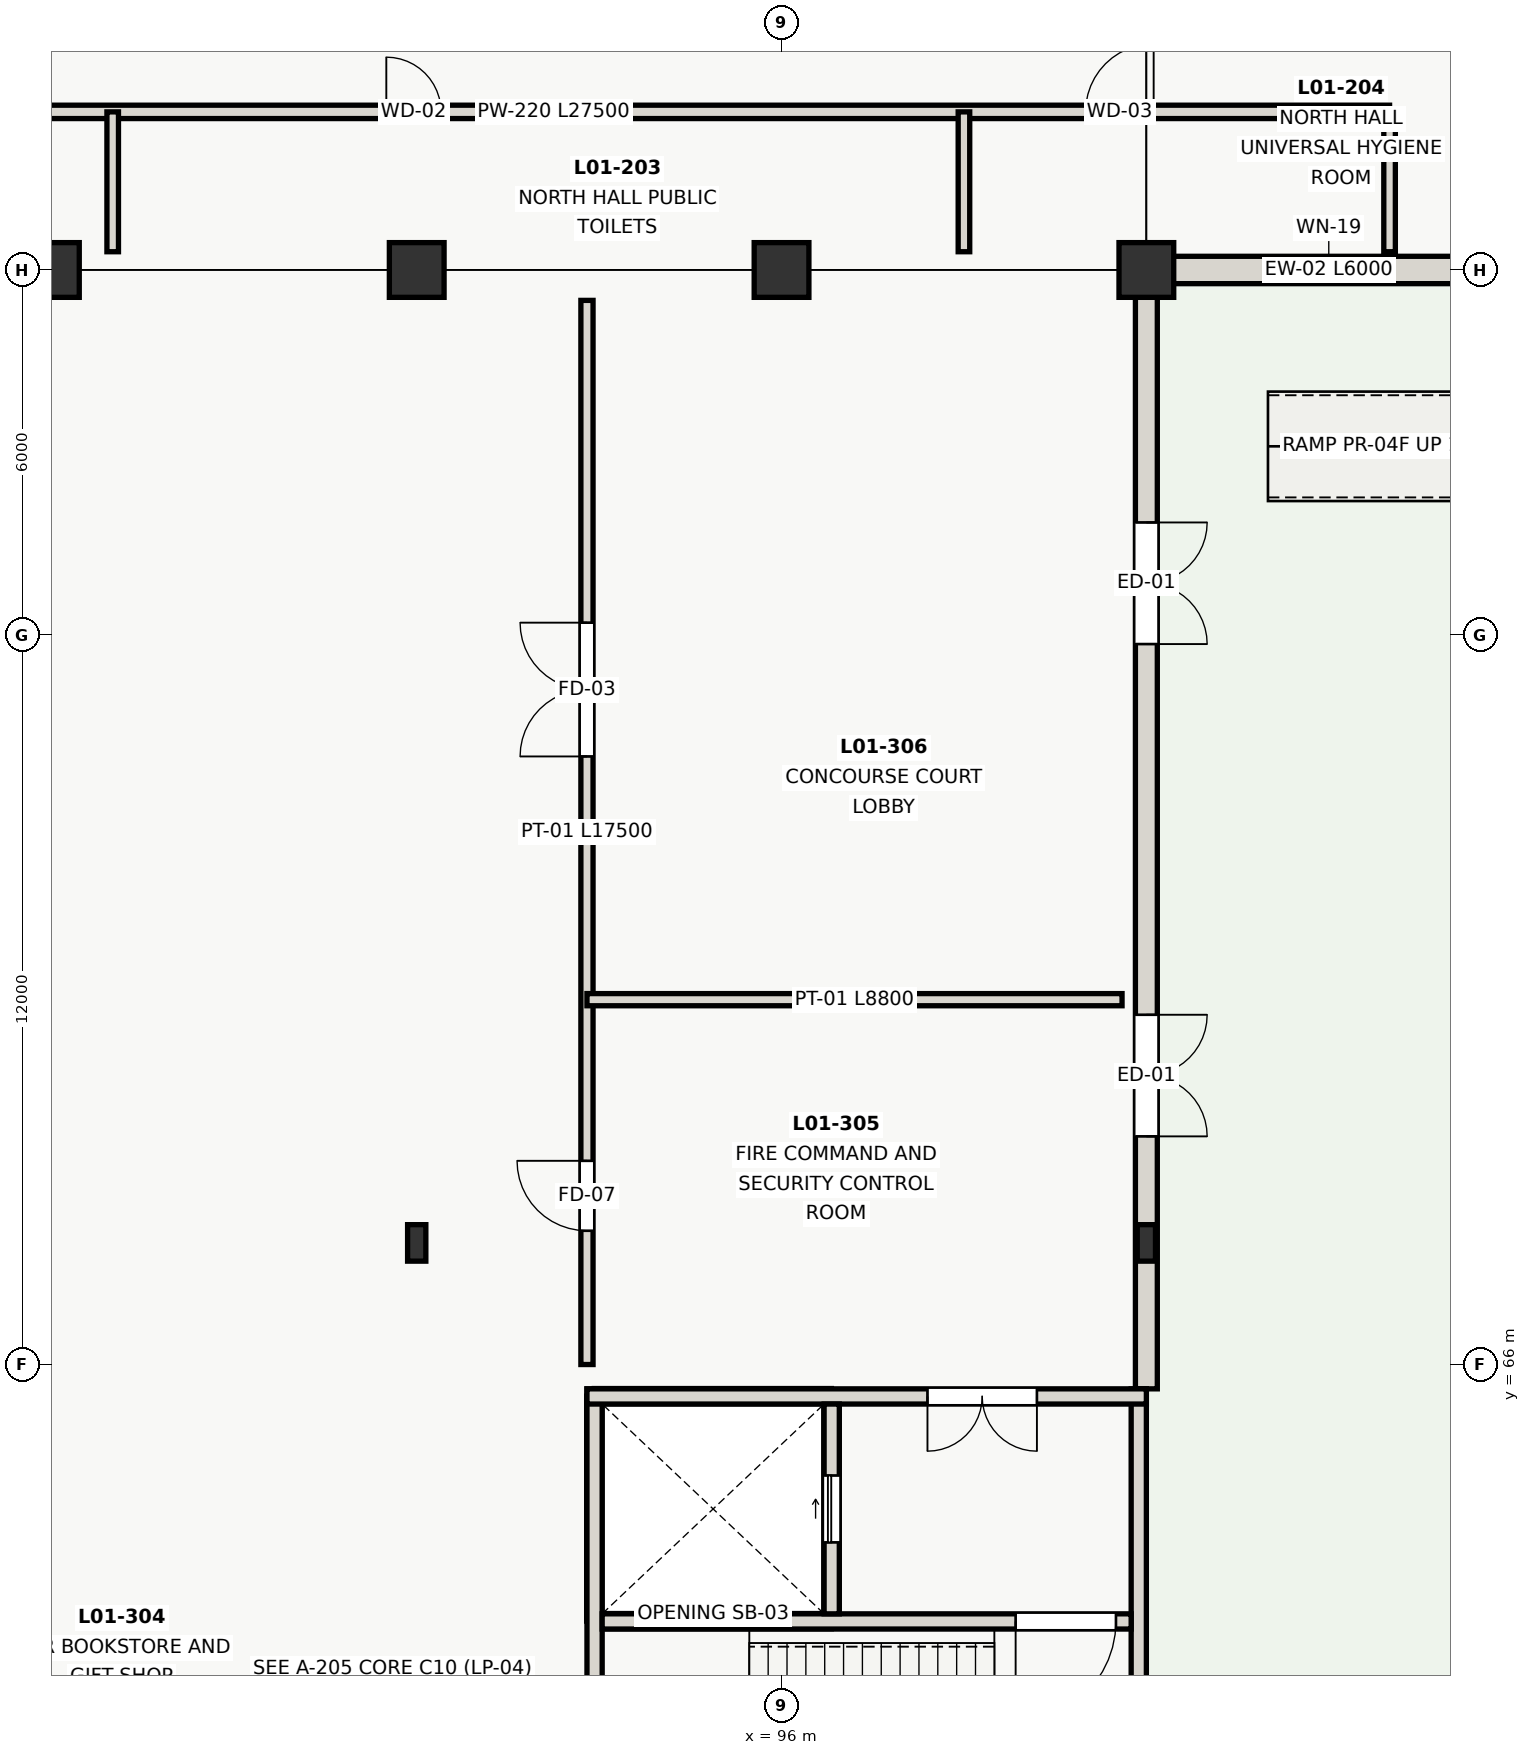
"""IFC4 building model, lengths in metres.
Left out: names, types, materials, properties, quantities, classifications, styles, units other than length and angle.
Written with IfcOpenShell. Run it as: python <this file> out.ifc"""

import sys

from ifc_helpers import new_model, si_unit, direction, frame, frame_2d, origin, origin_2d, place, context, subcontext, project, spatial, rectangle, i_section, extrude, element, fill, save


model = new_model("IFC4")
c1 = context("Model", 3, precision=1e-05, world=origin(), true_north=direction((0.0, 1.0)))
c2 = subcontext(c1, "Body", "Model", "MODEL_VIEW")
j1 = project(units=[si_unit("LENGTHUNIT", "METRE"), si_unit("PLANEANGLEUNIT", "RADIAN")], contexts=[c1])
p1 = place(None, origin())
s1 = spatial("IfcSite", under=j1, at=p1, CompositionType="ELEMENT")
p2 = place(p1, origin())
s2 = spatial("IfcBuilding", under=s1, at=p2, CompositionType="ELEMENT")
p3 = place(p2, origin())
s3 = spatial("IfcBuildingStorey", under=s2, at=p3, CompositionType="ELEMENT", Elevation=0.0)
for number, where, z_axis, x_axis in (
    (1, (90.0, 68.0, 0.0), (0.0, 0.0, 1.0), (1.0, 0.0, 0.0)),
    (2, (102.0, 68.0, 0.0), (0.0, 0.0, 1.0), (1.0, 0.0, 0.0)),
):
    element("IfcColumn", number, at=place(p3, frame(where, z_axis=z_axis, x_axis=x_axis)), inside=s3, PredefinedType="COLUMN", context=c2, shape_type="SweptSolid", body=[
        extrude(i_section(OverallWidth=0.3, OverallDepth=0.6, WebThickness=0.015, FlangeThickness=0.03, at=origin_2d()), origin(), (0.0, 0.0, 1.0), 4.2),
    ])
for number, where, z_axis, x_axis in (
    (3, (84.0, 84.0, 0.0), (0.0, 0.0, 1.0), (1.0, 0.0, 0.0)),
    (4, (90.0, 84.0, 0.0), (0.0, 0.0, 1.0), (1.0, 0.0, 0.0)),
    (5, (96.0, 84.0, 0.0), (0.0, 0.0, 1.0), (1.0, 0.0, 0.0)),
    (6, (102.0, 84.0, 0.0), (0.0, 0.0, 1.0), (1.0, 0.0, 0.0)),
):
    element("IfcColumn", number, at=place(p3, frame(where, z_axis=z_axis, x_axis=x_axis)), inside=s3, PredefinedType="COLUMN", context=c2, shape_type="SweptSolid", body=[
        extrude(rectangle(XDim=0.9, YDim=0.9, at=origin_2d()), origin(), (0.0, 0.0, 1.0), 4.2),
    ])
p4 = place(p3, frame((108.0, 84.0, 0.0), z_axis=(0.0, 0.0, 1.0), x_axis=(-1.0, 0.0, 0.0)))
e7 = element("IfcWall", 7, at=p4, inside=s3, PredefinedType="SOLIDWALL", context=c2, shape_type="SweptSolid", body=[
    extrude(rectangle(XDim=6.0, YDim=0.45, at=frame_2d((3.0, 0.0))), origin(), (0.0, 0.0, 1.0), 3.56),
])
p5 = place(p4, frame((2.05, 0.0, 0.9)))
e8 = element("IfcOpeningElement", 8, at=p5, cuts=e7, PredefinedType="OPENING", context=c2, shape_type="SweptSolid", body=[
    extrude(rectangle(XDim=1.9, YDim=1.8, at=frame_2d((0.95, 0.9))), frame((0.0, 0.235, 0.0), z_axis=(0.0, -1.0, 0.0), x_axis=(1.0, 0.0, 0.0)), (0.0, 0.0, 1.0), 0.47),
])
p6 = place(p3, frame((102.0, 84.0, 0.0), z_axis=(0.0, 0.0, 1.0), x_axis=(0.0, -1.0, 0.0)))
e9 = element("IfcWall", 9, at=p6, inside=s3, PredefinedType="SOLIDWALL", context=c2, shape_type="SweptSolid", body=[
    extrude(rectangle(XDim=18.4, YDim=0.36, at=frame_2d((9.2, 0.0))), origin(), (0.0, 0.0, 1.0), 3.35),
])
p7 = place(p6, frame((4.152, 0.0, 0.0)))
e10 = element("IfcOpeningElement", 10, at=p7, cuts=e9, PredefinedType="OPENING", context=c2, shape_type="SweptSolid", body=[
    extrude(rectangle(XDim=2.0, YDim=2.3, at=frame_2d((1.0, 1.15))), frame((0.0, 0.19, 0.0), z_axis=(0.0, -1.0, 0.0), x_axis=(1.0, 0.0, 0.0)), (0.0, 0.0, 1.0), 0.38),
])
p8 = place(p6, frame((12.248, 0.0, 0.0)))
e11 = element("IfcOpeningElement", 11, at=p8, cuts=e9, PredefinedType="OPENING", context=c2, shape_type="SweptSolid", body=[
    extrude(rectangle(XDim=2.0, YDim=2.3, at=frame_2d((1.0, 1.15))), frame((0.0, 0.19, 0.0), z_axis=(0.0, -1.0, 0.0), x_axis=(1.0, 0.0, 0.0)), (0.0, 0.0, 1.0), 0.38),
])
p9 = place(p3, frame((96.82, 61.78, -1.6), z_axis=(0.0, 0.0, 1.0), x_axis=(0.0, 1.0, 0.0)))
e12 = element("IfcWall", 12, at=p9, inside=s3, PredefinedType="SHEAR", context=c2, shape_type="SweptSolid", body=[
    extrude(rectangle(XDim=3.7, YDim=0.25, at=frame_2d((1.85, 0.0))), origin(), (0.0, 0.0, 1.0), 1.6),
])
p10 = place(p3, frame((96.82, 65.48, -1.6), z_axis=(0.0, 0.0, 1.0), x_axis=(-1.0, 0.0, 0.0)))
e13 = element("IfcWall", 13, at=p10, inside=s3, PredefinedType="SHEAR", context=c2, shape_type="SweptSolid", body=[
    extrude(rectangle(XDim=3.9, YDim=0.25, at=frame_2d((1.95, 0.0))), origin(), (0.0, 0.0, 1.0), 1.6),
])
p11 = place(p3, frame((92.92, 65.48, -1.6), z_axis=(0.0, 0.0, 1.0), x_axis=(0.0, -1.0, 0.0)))
e14 = element("IfcWall", 14, at=p11, inside=s3, PredefinedType="SHEAR", context=c2, shape_type="SweptSolid", body=[
    extrude(rectangle(XDim=3.7, YDim=0.25, at=frame_2d((1.85, 0.0))), origin(), (0.0, 0.0, 1.0), 1.6),
])
p12 = place(p3, frame((92.92, 61.78, -1.6), z_axis=(0.0, 0.0, 1.0), x_axis=(1.0, 0.0, 0.0)))
e15 = element("IfcWall", 15, at=p12, inside=s3, PredefinedType="SHEAR", context=c2, shape_type="SweptSolid", body=[
    extrude(rectangle(XDim=3.9, YDim=0.25, at=frame_2d((1.95, 0.0))), origin(), (0.0, 0.0, 1.0), 1.6),
])
p13 = place(p3, frame((101.875, 65.6, 0.0), z_axis=(0.0, 0.0, 1.0), x_axis=(0.0, -1.0, 0.0)))
e16 = element("IfcWall", 16, at=p13, inside=s3, PredefinedType="SHEAR", context=c2, shape_type="SweptSolid", body=[
    extrude(rectangle(XDim=9.2, YDim=0.25, at=frame_2d((4.6, 0.0))), origin(), (0.0, 0.0, 1.0), 4.2),
])
p14 = place(p13, frame((5.9, 0.0, 0.0)))
e17 = element("IfcOpeningElement", 17, at=p14, cuts=e16, PredefinedType="OPENING", context=c2, shape_type="SweptSolid", body=[
    extrude(rectangle(XDim=1.9, YDim=2.2, at=frame_2d((0.95, 1.1))), frame((0.0, 0.135, 0.0), z_axis=(0.0, -1.0, 0.0), x_axis=(1.0, 0.0, 0.0)), (0.0, 0.0, 1.0), 0.27),
])
p15 = place(p3, frame((92.925, 56.4, 0.0), z_axis=(0.0, 0.0, 1.0), x_axis=(0.0, 1.0, 0.0)))
e18 = element("IfcWall", 18, at=p15, inside=s3, PredefinedType="SHEAR", context=c2, shape_type="SweptSolid", body=[
    extrude(rectangle(XDim=9.2, YDim=0.25, at=frame_2d((4.6, 0.0))), origin(), (0.0, 0.0, 1.0), 4.2),
])
p16 = place(p3, frame((102.0, 65.475, 0.0), z_axis=(0.0, 0.0, 1.0), x_axis=(-1.0, 0.0, 0.0)))
e19 = element("IfcWall", 19, at=p16, inside=s3, PredefinedType="SHEAR", context=c2, shape_type="SweptSolid", body=[
    extrude(rectangle(XDim=9.2, YDim=0.25, at=frame_2d((4.6, 0.0))), origin(), (0.0, 0.0, 1.0), 4.2),
])
p17 = place(p16, frame((1.8, 0.0, 0.0)))
e20 = element("IfcOpeningElement", 20, at=p17, cuts=e19, PredefinedType="OPENING", context=c2, shape_type="SweptSolid", body=[
    extrude(rectangle(XDim=1.8, YDim=2.15, at=frame_2d((0.9, 1.075))), frame((0.0, 0.135, 0.0), z_axis=(0.0, -1.0, 0.0), x_axis=(1.0, 0.0, 0.0)), (0.0, 0.0, 1.0), 0.27),
])
p18 = place(p3, frame((101.75, 61.775, 0.0), z_axis=(0.0, 0.0, 1.0), x_axis=(-1.0, 0.0, 0.0)))
e21 = element("IfcWall", 21, at=p18, inside=s3, PredefinedType="SHEAR", context=c2, shape_type="SweptSolid", body=[
    extrude(rectangle(XDim=8.7, YDim=0.25, at=frame_2d((4.35, 0.0))), origin(), (0.0, 0.0, 1.0), 4.2),
])
p19 = place(p18, frame((0.25, 0.0, 0.0)))
e22 = element("IfcOpeningElement", 22, at=p19, cuts=e21, PredefinedType="OPENING", context=c2, shape_type="SweptSolid", body=[
    extrude(rectangle(XDim=1.65, YDim=2.1, at=frame_2d((0.825, 1.05))), frame((0.0, 0.135, 0.0), z_axis=(0.0, -1.0, 0.0), x_axis=(1.0, 0.0, 0.0)), (0.0, 0.0, 1.0), 0.27),
])
p20 = place(p3, frame((96.825, 61.9, 0.0), z_axis=(0.0, 0.0, 1.0), x_axis=(0.0, 1.0, 0.0)))
e23 = element("IfcWall", 23, at=p20, inside=s3, PredefinedType="SHEAR", context=c2, shape_type="SweptSolid", body=[
    extrude(rectangle(XDim=3.45, YDim=0.25, at=frame_2d((1.725, 0.0))), origin(), (0.0, 0.0, 1.0), 4.2),
])
p21 = place(p20, frame((1.175, 0.0, 0.0)))
e24 = element("IfcOpeningElement", 24, at=p21, cuts=e23, PredefinedType="OPENING", context=c2, shape_type="SweptSolid", body=[
    extrude(rectangle(XDim=1.1, YDim=2.1, at=frame_2d((0.55, 1.05))), frame((0.0, 0.135, 0.0), z_axis=(0.0, -1.0, 0.0), x_axis=(1.0, 0.0, 0.0)), (0.0, 0.0, 1.0), 0.27),
])
p22 = place(p3, frame((78.5, 86.6, 0.0), z_axis=(0.0, 0.0, 1.0), x_axis=(1.0, 0.0, 0.0)))
e25 = element("IfcWall", 25, at=p22, inside=s3, PredefinedType="PLUMBINGWALL", context=c2, shape_type="SweptSolid", body=[
    extrude(rectangle(XDim=27.5, YDim=0.22, at=frame_2d((13.75, 0.0))), origin(), (0.0, 0.0, 1.0), 3.7),
])
p23 = place(p22, frame((2.5, 0.0, 0.0)))
e26 = element("IfcOpeningElement", 26, at=p23, cuts=e25, PredefinedType="OPENING", context=c2, shape_type="SweptSolid", body=[
    extrude(rectangle(XDim=1.0, YDim=2.1, at=frame_2d((0.5, 1.05))), frame((0.0, 0.12, 0.0), z_axis=(0.0, -1.0, 0.0), x_axis=(1.0, 0.0, 0.0)), (0.0, 0.0, 1.0), 0.24),
])
p24 = place(p22, frame((11.0, 0.0, 0.0)))
e27 = element("IfcOpeningElement", 27, at=p24, cuts=e25, PredefinedType="OPENING", context=c2, shape_type="SweptSolid", body=[
    extrude(rectangle(XDim=0.9, YDim=2.05, at=frame_2d((0.45, 1.025))), frame((0.0, 0.12, 0.0), z_axis=(0.0, -1.0, 0.0), x_axis=(1.0, 0.0, 0.0)), (0.0, 0.0, 1.0), 0.24),
])
p25 = place(p22, frame((22.5, 0.0, 0.0)))
e28 = element("IfcOpeningElement", 28, at=p25, cuts=e25, PredefinedType="OPENING", context=c2, shape_type="SweptSolid", body=[
    extrude(rectangle(XDim=1.12, YDim=2.1, at=frame_2d((0.56, 1.05))), frame((0.0, 0.12, 0.0), z_axis=(0.0, -1.0, 0.0), x_axis=(1.0, 0.0, 0.0)), (0.0, 0.0, 1.0), 0.24),
])
for number, where, z_axis, x_axis in (
    (29, (85.0, 84.3, 0.0), (0.0, 0.0, 1.0), (0.0, 1.0, 0.0)),
    (30, (99.0, 84.3, 0.0), (0.0, 0.0, 1.0), (0.0, 1.0, 0.0)),
    (31, (106.0, 84.3, 0.0), (0.0, 0.0, 1.0), (0.0, 1.0, 0.0)),
):
    element("IfcWall", number, at=place(p3, frame(where, z_axis=z_axis, x_axis=x_axis)), inside=s3, PredefinedType="PLUMBINGWALL", context=c2, shape_type="SweptSolid", body=[
        extrude(rectangle(XDim=2.3, YDim=0.19, at=frame_2d((1.15, 0.0))), origin(), (0.0, 0.0, 1.0), 3.7),
    ])
p26 = place(p3, frame((92.8, 66.0, 0.0), z_axis=(0.0, 0.0, 1.0), x_axis=(0.0, 1.0, 0.0)))
e32 = element("IfcWall", 32, at=p26, inside=s3, PredefinedType="PARTITIONING", context=c2, shape_type="SweptSolid", body=[
    extrude(rectangle(XDim=17.5, YDim=0.2, at=frame_2d((8.75, 0.0))), origin(), (0.0, 0.0, 1.0), 3.72),
])
p27 = place(p26, frame((2.2, 0.0, 0.0)))
e33 = element("IfcOpeningElement", 33, at=p27, cuts=e32, PredefinedType="OPENING", context=c2, shape_type="SweptSolid", body=[
    extrude(rectangle(XDim=1.15, YDim=2.1, at=frame_2d((0.575, 1.05))), frame((0.0, 0.11, 0.0), z_axis=(0.0, -1.0, 0.0), x_axis=(1.0, 0.0, 0.0)), (0.0, 0.0, 1.0), 0.22),
])
p28 = place(p26, frame((10.0, 0.0, 0.0)))
e34 = element("IfcOpeningElement", 34, at=p28, cuts=e32, PredefinedType="OPENING", context=c2, shape_type="SweptSolid", body=[
    extrude(rectangle(XDim=2.2, YDim=2.3, at=frame_2d((1.1, 1.15))), frame((0.0, 0.11, 0.0), z_axis=(0.0, -1.0, 0.0), x_axis=(1.0, 0.0, 0.0)), (0.0, 0.0, 1.0), 0.22),
])
p29 = place(p3, frame((92.8, 72.0, 0.0), z_axis=(0.0, 0.0, 1.0), x_axis=(1.0, 0.0, 0.0)))
e35 = element("IfcWall", 35, at=p29, inside=s3, PredefinedType="PARTITIONING", context=c2, shape_type="SweptSolid", body=[
    extrude(rectangle(XDim=8.8, YDim=0.2, at=frame_2d((4.4, 0.0))), origin(), (0.0, 0.0, 1.0), 3.72),
])
p30 = place(p5, origin())
e36 = element("IfcWindow", 36, at=p30, inside=s3, PartitioningType="SINGLE_PANEL", PredefinedType="WINDOW", context=c2, shape_type="SweptSolid", body=[
    extrude(rectangle(XDim=1.9, YDim=1.8, at=frame_2d((0.95, 0.9))), frame((0.0, 0.03, 0.0), z_axis=(0.0, -1.0, 0.0), x_axis=(1.0, 0.0, 0.0)), (0.0, 0.0, 1.0), 0.06),
])
fill(e8, e36)
p31 = place(p7, origin())
e37 = element("IfcDoor", 37, at=p31, inside=s3, OperationType="DOUBLE_DOOR_SINGLE_SWING", PredefinedType="DOOR", context=c2, shape_type="SweptSolid", body=[
    extrude(rectangle(XDim=2.0, YDim=2.3, at=frame_2d((1.0, 1.15))), frame((0.0, 0.025, 0.0), z_axis=(0.0, -1.0, 0.0), x_axis=(1.0, 0.0, 0.0)), (0.0, 0.0, 1.0), 0.05),
])
fill(e10, e37)
p32 = place(p8, origin())
e38 = element("IfcDoor", 38, at=p32, inside=s3, OperationType="DOUBLE_DOOR_SINGLE_SWING", PredefinedType="DOOR", context=c2, shape_type="SweptSolid", body=[
    extrude(rectangle(XDim=2.0, YDim=2.3, at=frame_2d((1.0, 1.15))), frame((0.0, 0.025, 0.0), z_axis=(0.0, -1.0, 0.0), x_axis=(1.0, 0.0, 0.0)), (0.0, 0.0, 1.0), 0.05),
])
fill(e11, e38)
p33 = place(p17, origin())
e39 = element("IfcDoor", 39, at=p33, inside=s3, OperationType="DOUBLE_DOOR_SINGLE_SWING", PredefinedType="DOOR", context=c2, shape_type="SweptSolid", body=[
    extrude(rectangle(XDim=1.8, YDim=2.15, at=frame_2d((0.9, 1.075))), frame((0.0, 0.025, 0.0), z_axis=(0.0, -1.0, 0.0), x_axis=(1.0, 0.0, 0.0)), (0.0, 0.0, 1.0), 0.05),
])
fill(e20, e39)
p34 = place(p19, origin())
e40 = element("IfcDoor", 40, at=p34, inside=s3, OperationType="SINGLE_SWING_RIGHT", PredefinedType="DOOR", context=c2, shape_type="SweptSolid", body=[
    extrude(rectangle(XDim=1.65, YDim=2.1, at=frame_2d((0.825, 1.05))), frame((0.0, 0.025, 0.0), z_axis=(0.0, -1.0, 0.0), x_axis=(1.0, 0.0, 0.0)), (0.0, 0.0, 1.0), 0.05),
])
fill(e22, e40)
p35 = place(p21, origin())
e41 = element("IfcDoor", 41, at=p35, inside=s3, OperationType="SLIDING_TO_RIGHT", PredefinedType="DOOR", context=c2, shape_type="SweptSolid", body=[
    extrude(rectangle(XDim=1.1, YDim=2.1, at=frame_2d((0.55, 1.05))), frame((0.0, 0.025, 0.0), z_axis=(0.0, -1.0, 0.0), x_axis=(1.0, 0.0, 0.0)), (0.0, 0.0, 1.0), 0.05),
])
fill(e24, e41)
p36 = place(p24, origin())
e42 = element("IfcDoor", 42, at=p36, inside=s3, OperationType="SINGLE_SWING_LEFT", PredefinedType="DOOR", context=c2, shape_type="SweptSolid", body=[
    extrude(rectangle(XDim=0.9, YDim=2.05, at=frame_2d((0.45, 1.025))), frame((0.0, 0.025, 0.0), z_axis=(0.0, -1.0, 0.0), x_axis=(1.0, 0.0, 0.0)), (0.0, 0.0, 1.0), 0.05),
])
fill(e27, e42)
p37 = place(p25, origin())
e43 = element("IfcDoor", 43, at=p37, inside=s3, OperationType="SINGLE_SWING_RIGHT", PredefinedType="DOOR", context=c2, shape_type="SweptSolid", body=[
    extrude(rectangle(XDim=1.12, YDim=2.1, at=frame_2d((0.56, 1.05))), frame((0.0, 0.025, 0.0), z_axis=(0.0, -1.0, 0.0), x_axis=(1.0, 0.0, 0.0)), (0.0, 0.0, 1.0), 0.05),
])
fill(e28, e43)
p38 = place(p27, origin())
e44 = element("IfcDoor", 44, at=p38, inside=s3, OperationType="SINGLE_SWING_RIGHT", PredefinedType="DOOR", context=c2, shape_type="SweptSolid", body=[
    extrude(rectangle(XDim=1.15, YDim=2.1, at=frame_2d((0.575, 1.05))), frame((0.0, 0.025, 0.0), z_axis=(0.0, -1.0, 0.0), x_axis=(1.0, 0.0, 0.0)), (0.0, 0.0, 1.0), 0.05),
])
fill(e33, e44)
p39 = place(p28, origin())
e45 = element("IfcDoor", 45, at=p39, inside=s3, OperationType="DOUBLE_DOOR_SINGLE_SWING", PredefinedType="DOOR", context=c2, shape_type="SweptSolid", body=[
    extrude(rectangle(XDim=2.2, YDim=2.3, at=frame_2d((1.1, 1.15))), frame((0.0, 0.025, 0.0), z_axis=(0.0, -1.0, 0.0), x_axis=(1.0, 0.0, 0.0)), (0.0, 0.0, 1.0), 0.05),
])
fill(e34, e45)
save(model, sys.argv[1])
